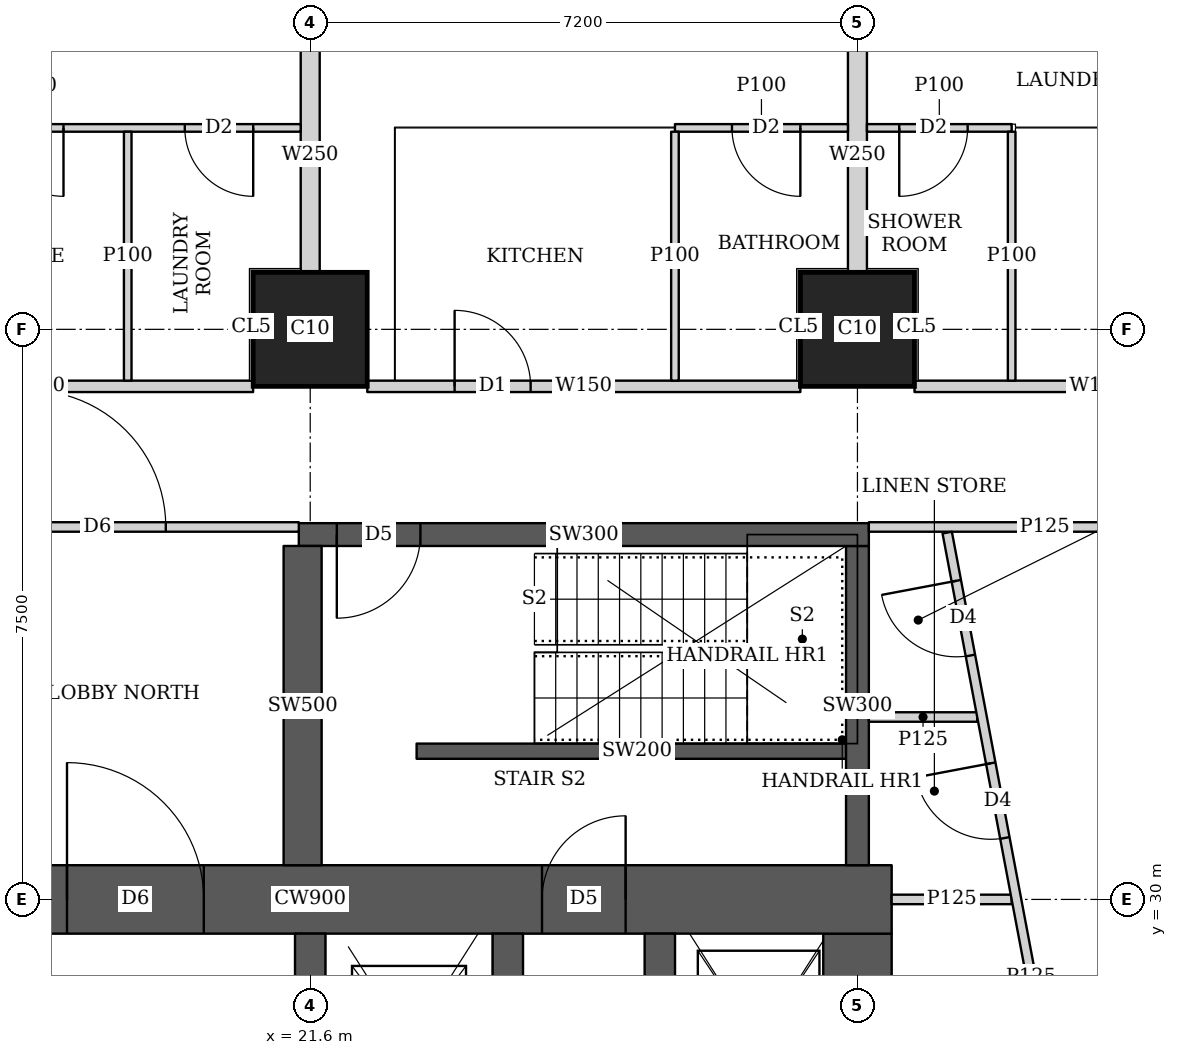
"""IFC4 building model, lengths in metres.
Left out: names, types, materials, properties, quantities, classifications, styles, units other than length and angle.
Written with IfcOpenShell. Run it as: python <this file> out.ifc"""

import sys

from ifc_helpers import new_model, si_unit, direction, frame, frame_2d, origin, origin_2d, place, context, subcontext, project, spatial, rectangle, extrude, element, fill, save


model = new_model("IFC4")
c1 = context("Model", 3, precision=1e-05, world=origin(), true_north=direction((0.0, 1.0)))
c2 = subcontext(c1, "Body", "Model", "MODEL_VIEW")
j1 = project(units=[si_unit("LENGTHUNIT", "METRE"), si_unit("PLANEANGLEUNIT", "RADIAN")], contexts=[c1])
p1 = place(None, origin())
s1 = spatial("IfcSite", under=j1, at=p1, CompositionType="ELEMENT")
p2 = place(p1, origin())
s2 = spatial("IfcBuilding", under=s1, at=p2, CompositionType="ELEMENT")
p3 = place(p2, frame((0.0, 0.0, 169.55)))
s3 = spatial("IfcBuildingStorey", under=s2, at=p3, CompositionType="ELEMENT", Elevation=169.55)
for number, where, z_axis, x_axis in (
    (1, (21.6, 37.5, 0.0), (0.0, 0.0, 1.0), (1.0, 0.0, 0.0)),
    (2, (28.8, 37.5, 0.0), (0.0, 0.0, 1.0), (1.0, 0.0, 0.0)),
):
    element("IfcColumn", number, at=place(p3, frame(where, z_axis=z_axis, x_axis=x_axis)), inside=s3, PredefinedType="COLUMN", context=c2, shape_type="SweptSolid", body=[
        extrude(rectangle(XDim=1.5, YDim=1.5, at=origin_2d()), origin(), (0.0, 0.0, 1.0), 3.75),
    ])
p4 = place(p3, frame((13.95, 30.0, 0.0), z_axis=(0.0, 0.0, 1.0), x_axis=(1.0, 0.0, 0.0)))
e3 = element("IfcWall", 3, at=p4, inside=s3, PredefinedType="SHEAR", context=c2, shape_type="SweptSolid", body=[
    extrude(rectangle(XDim=15.3, YDim=0.9, at=frame_2d((7.65, 0.0))), origin(), (0.0, 0.0, 1.0), 3.75),
])
p5 = place(p4, frame((4.45, 0.0, 0.0)))
e4 = element("IfcOpeningElement", 4, at=p5, cuts=e3, PredefinedType="OPENING", context=c2, shape_type="SweptSolid", body=[
    extrude(rectangle(XDim=1.8, YDim=2.1, at=frame_2d((0.9, 1.05))), frame((0.0, 0.46, 0.0), z_axis=(0.0, -1.0, 0.0), x_axis=(1.0, 0.0, 0.0)), (0.0, 0.0, 1.0), 0.92),
])
p6 = place(p4, frame((10.7, 0.0, 0.0)))
e5 = element("IfcOpeningElement", 5, at=p6, cuts=e3, PredefinedType="OPENING", context=c2, shape_type="SweptSolid", body=[
    extrude(rectangle(XDim=1.1, YDim=2.1, at=frame_2d((0.55, 1.05))), frame((0.0, 0.46, 0.0), z_axis=(0.0, -1.0, 0.0), x_axis=(1.0, 0.0, 0.0)), (0.0, 0.0, 1.0), 0.92),
])
p7 = place(p3, frame((28.8, 15.45, 0.0), z_axis=(0.0, 0.0, 1.0), x_axis=(0.0, 1.0, 0.0)))
e6 = element("IfcWall", 6, at=p7, inside=s3, PredefinedType="SHEAR", context=c2, shape_type="SweptSolid", body=[
    extrude(rectangle(XDim=14.1, YDim=0.9, at=frame_2d((7.05, 0.0))), origin(), (0.0, 0.0, 1.0), 3.75),
])
p8 = place(p3, frame((21.6, 15.45, 0.0), z_axis=(0.0, 0.0, 1.0), x_axis=(0.0, 1.0, 0.0)))
e7 = element("IfcWall", 7, at=p8, inside=s3, PredefinedType="SHEAR", context=c2, shape_type="SweptSolid", body=[
    extrude(rectangle(XDim=14.1, YDim=0.4, at=frame_2d((7.05, 0.0))), origin(), (0.0, 0.0, 1.0), 3.75),
])
p9 = place(p8, frame((0.875, 0.0, 0.0)))
e8 = element("IfcOpeningElement", 8, at=p9, cuts=e7, PredefinedType="OPENING", context=c2, shape_type="SweptSolid", body=[
    extrude(rectangle(XDim=1.1, YDim=2.1, at=frame_2d((0.55, 1.05))), frame((0.0, 0.21, 0.0), z_axis=(0.0, -1.0, 0.0), x_axis=(1.0, 0.0, 0.0)), (0.0, 0.0, 1.0), 0.42),
])
p10 = place(p8, frame((4.625, 0.0, 0.0)))
e9 = element("IfcOpeningElement", 9, at=p10, cuts=e7, PredefinedType="OPENING", context=c2, shape_type="SweptSolid", body=[
    extrude(rectangle(XDim=1.1, YDim=2.1, at=frame_2d((0.55, 1.05))), frame((0.0, 0.21, 0.0), z_axis=(0.0, -1.0, 0.0), x_axis=(1.0, 0.0, 0.0)), (0.0, 0.0, 1.0), 0.42),
])
p11 = place(p8, frame((8.375, 0.0, 0.0)))
e10 = element("IfcOpeningElement", 10, at=p11, cuts=e7, PredefinedType="OPENING", context=c2, shape_type="SweptSolid", body=[
    extrude(rectangle(XDim=1.1, YDim=2.1, at=frame_2d((0.55, 1.05))), frame((0.0, 0.21, 0.0), z_axis=(0.0, -1.0, 0.0), x_axis=(1.0, 0.0, 0.0)), (0.0, 0.0, 1.0), 0.42),
])
p12 = place(p8, frame((12.125, 0.0, 0.0)))
e11 = element("IfcOpeningElement", 11, at=p12, cuts=e7, PredefinedType="OPENING", context=c2, shape_type="SweptSolid", body=[
    extrude(rectangle(XDim=1.1, YDim=2.1, at=frame_2d((0.55, 1.05))), frame((0.0, 0.21, 0.0), z_axis=(0.0, -1.0, 0.0), x_axis=(1.0, 0.0, 0.0)), (0.0, 0.0, 1.0), 0.42),
])
p13 = place(p3, frame((24.2, 15.45, 0.0), z_axis=(0.0, 0.0, 1.0), x_axis=(0.0, 1.0, 0.0)))
e12 = element("IfcWall", 12, at=p13, inside=s3, PredefinedType="SHEAR", context=c2, shape_type="SweptSolid", body=[
    extrude(rectangle(XDim=14.1, YDim=0.4, at=frame_2d((7.05, 0.0))), origin(), (0.0, 0.0, 1.0), 3.75),
])
p14 = place(p3, frame((26.2, 26.45, 0.0), z_axis=(0.0, 0.0, 1.0), x_axis=(0.0, 1.0, 0.0)))
e13 = element("IfcWall", 13, at=p14, inside=s3, PredefinedType="SHEAR", context=c2, shape_type="SweptSolid", body=[
    extrude(rectangle(XDim=3.1, YDim=0.4, at=frame_2d((1.55, 0.0))), origin(), (0.0, 0.0, 1.0), 3.75),
])
p15 = place(p14, frame((1.075, 0.0, 0.0)))
e14 = element("IfcOpeningElement", 14, at=p15, cuts=e13, PredefinedType="OPENING", context=c2, shape_type="SweptSolid", body=[
    extrude(rectangle(XDim=1.2, YDim=2.1, at=frame_2d((0.6, 1.05))), frame((0.0, 0.21, 0.0), z_axis=(0.0, -1.0, 0.0), x_axis=(1.0, 0.0, 0.0)), (0.0, 0.0, 1.0), 0.42),
])
p16 = place(p3, frame((21.45, 34.8, 0.0), z_axis=(0.0, 0.0, 1.0), x_axis=(1.0, 0.0, 0.0)))
e15 = element("IfcWall", 15, at=p16, inside=s3, PredefinedType="SHEAR", context=c2, shape_type="SweptSolid", body=[
    extrude(rectangle(XDim=7.5, YDim=0.3, at=frame_2d((3.75, 0.0))), origin(), (0.0, 0.0, 1.0), 3.75),
])
p17 = place(p16, frame((0.5, 0.0, 0.0)))
e16 = element("IfcOpeningElement", 16, at=p17, cuts=e15, PredefinedType="OPENING", context=c2, shape_type="SweptSolid", body=[
    extrude(rectangle(XDim=1.1, YDim=2.1, at=frame_2d((0.55, 1.05))), frame((0.0, 0.16, 0.0), z_axis=(0.0, -1.0, 0.0), x_axis=(1.0, 0.0, 0.0)), (0.0, 0.0, 1.0), 0.32),
])
p18 = place(p3, frame((21.5, 30.45, 0.0), z_axis=(0.0, 0.0, 1.0), x_axis=(0.0, 1.0, 0.0)))
e17 = element("IfcWall", 17, at=p18, inside=s3, PredefinedType="SHEAR", context=c2, shape_type="SweptSolid", body=[
    extrude(rectangle(XDim=4.2, YDim=0.5, at=frame_2d((2.1, 0.0))), origin(), (0.0, 0.0, 1.0), 3.75),
])
p19 = place(p3, frame((28.8, 30.45, 0.0), z_axis=(0.0, 0.0, 1.0), x_axis=(0.0, 1.0, 0.0)))
e18 = element("IfcWall", 18, at=p19, inside=s3, PredefinedType="SHEAR", context=c2, shape_type="SweptSolid", body=[
    extrude(rectangle(XDim=4.2, YDim=0.3, at=frame_2d((2.1, 0.0))), origin(), (0.0, 0.0, 1.0), 3.75),
])
p20 = place(p3, frame((15.151, 36.75, 0.0), z_axis=(0.0, 0.0, 1.0), x_axis=(1.0, 0.0, 0.0)))
e19 = element("IfcWall", 19, at=p20, inside=s3, PredefinedType="SOLIDWALL", context=c2, shape_type="SweptSolid", body=[
    extrude(rectangle(XDim=5.698, YDim=0.15, at=frame_2d((2.849, 0.0))), origin(), (0.0, 0.0, 1.0), 3.5),
])
p21 = place(p3, frame((22.351, 36.75, 0.0), z_axis=(0.0, 0.0, 1.0), x_axis=(1.0, 0.0, 0.0)))
e20 = element("IfcWall", 20, at=p21, inside=s3, PredefinedType="SOLIDWALL", context=c2, shape_type="SweptSolid", body=[
    extrude(rectangle(XDim=5.698, YDim=0.15, at=frame_2d((2.849, 0.0))), origin(), (0.0, 0.0, 1.0), 3.5),
])
p22 = place(p21, frame((1.149, 0.0, 0.0)))
e21 = element("IfcOpeningElement", 21, at=p22, cuts=e20, PredefinedType="OPENING", context=c2, shape_type="SweptSolid", body=[
    extrude(rectangle(XDim=1.0, YDim=2.1, at=frame_2d((0.5, 1.05))), frame((0.0, 0.085, 0.0), z_axis=(0.0, -1.0, 0.0), x_axis=(1.0, 0.0, 0.0)), (0.0, 0.0, 1.0), 0.17),
])
p23 = place(p3, frame((29.551, 36.75, 0.0), z_axis=(0.0, 0.0, 1.0), x_axis=(1.0, 0.0, 0.0)))
e22 = element("IfcWall", 22, at=p23, inside=s3, PredefinedType="SOLIDWALL", context=c2, shape_type="SweptSolid", body=[
    extrude(rectangle(XDim=5.422, YDim=0.15, at=frame_2d((2.711, 0.0))), origin(), (0.0, 0.0, 1.0), 3.5),
])
p24 = place(p23, frame((2.895, 0.0, 0.0)))
e23 = element("IfcOpeningElement", 23, at=p24, cuts=e22, PredefinedType="OPENING", context=c2, shape_type="SweptSolid", body=[
    extrude(rectangle(XDim=1.0, YDim=2.1, at=frame_2d((0.5, 1.05))), frame((0.0, 0.085, 0.0), z_axis=(0.0, -1.0, 0.0), x_axis=(1.0, 0.0, 0.0)), (0.0, 0.0, 1.0), 0.17),
])
p25 = place(p3, frame((14.4, 40.15, 0.0), z_axis=(0.0, 0.0, 1.0), x_axis=(1.0, 0.0, 0.0)))
e24 = element("IfcWall", 24, at=p25, inside=s3, PredefinedType="PARTITIONING", context=c2, shape_type="SweptSolid", body=[
    extrude(rectangle(XDim=7.075, YDim=0.1, at=frame_2d((3.538, 0.0))), origin(), (0.0, 0.0, 1.0), 3.5),
])
p26 = place(p25, frame((0.655, 0.0, 0.0)))
e25 = element("IfcOpeningElement", 25, at=p26, cuts=e24, PredefinedType="OPENING", context=c2, shape_type="SweptSolid", body=[
    extrude(rectangle(XDim=0.9, YDim=2.1, at=frame_2d((0.45, 1.05))), frame((0.0, 0.06, 0.0), z_axis=(0.0, -1.0, 0.0), x_axis=(1.0, 0.0, 0.0)), (0.0, 0.0, 1.0), 0.12),
])
p27 = place(p25, frame((5.55, 0.0, 0.0)))
e26 = element("IfcOpeningElement", 26, at=p27, cuts=e24, PredefinedType="OPENING", context=c2, shape_type="SweptSolid", body=[
    extrude(rectangle(XDim=0.9, YDim=2.1, at=frame_2d((0.45, 1.05))), frame((0.0, 0.06, 0.0), z_axis=(0.0, -1.0, 0.0), x_axis=(1.0, 0.0, 0.0)), (0.0, 0.0, 1.0), 0.12),
])
p28 = place(p25, frame((3.054, 0.0, 0.0)))
e27 = element("IfcOpeningElement", 27, at=p28, cuts=e24, PredefinedType="OPENING", context=c2, shape_type="SweptSolid", body=[
    extrude(rectangle(XDim=0.9, YDim=2.1, at=frame_2d((0.45, 1.05))), frame((0.0, 0.06, 0.0), z_axis=(0.0, -1.0, 0.0), x_axis=(1.0, 0.0, 0.0)), (0.0, 0.0, 1.0), 0.12),
])
p29 = place(p3, frame((19.199, 36.825, 0.0), z_axis=(0.0, 0.0, 1.0), x_axis=(0.0, 1.0, 0.0)))
e28 = element("IfcWall", 28, at=p29, inside=s3, PredefinedType="PARTITIONING", context=c2, shape_type="SweptSolid", body=[
    extrude(rectangle(XDim=3.275, YDim=0.1, at=frame_2d((1.638, 0.0))), origin(), (0.0, 0.0, 1.0), 3.5),
])
p30 = place(p3, frame((26.399, 40.15, 0.0), z_axis=(0.0, 0.0, 1.0), x_axis=(1.0, 0.0, 0.0)))
e29 = element("IfcWall", 29, at=p30, inside=s3, PredefinedType="PARTITIONING", context=c2, shape_type="SweptSolid", body=[
    extrude(rectangle(XDim=2.276, YDim=0.1, at=frame_2d((1.138, 0.0))), origin(), (0.0, 0.0, 1.0), 3.5),
])
p31 = place(p30, frame((0.75, 0.0, 0.0)))
e30 = element("IfcOpeningElement", 30, at=p31, cuts=e29, PredefinedType="OPENING", context=c2, shape_type="SweptSolid", body=[
    extrude(rectangle(XDim=0.9, YDim=2.1, at=frame_2d((0.45, 1.05))), frame((0.0, 0.06, 0.0), z_axis=(0.0, -1.0, 0.0), x_axis=(1.0, 0.0, 0.0)), (0.0, 0.0, 1.0), 0.12),
])
p32 = place(p3, frame((26.399, 36.825, 0.0), z_axis=(0.0, 0.0, 1.0), x_axis=(0.0, 1.0, 0.0)))
e31 = element("IfcWall", 31, at=p32, inside=s3, PredefinedType="PARTITIONING", context=c2, shape_type="SweptSolid", body=[
    extrude(rectangle(XDim=3.275, YDim=0.1, at=frame_2d((1.638, 0.0))), origin(), (0.0, 0.0, 1.0), 3.5),
])
p33 = place(p3, frame((21.6, 38.251, 0.0), z_axis=(0.0, 0.0, 1.0), x_axis=(0.0, 1.0, 0.0)))
e32 = element("IfcWall", 32, at=p33, inside=s3, PredefinedType="SOLIDWALL", context=c2, shape_type="SweptSolid", body=[
    extrude(rectangle(XDim=3.099, YDim=0.25, at=frame_2d((1.55, 0.0))), origin(), (0.0, 0.0, 1.0), 3.5),
])
p34 = place(p3, frame((28.925, 40.15, 0.0), z_axis=(0.0, 0.0, 1.0), x_axis=(1.0, 0.0, 0.0)))
e33 = element("IfcWall", 33, at=p34, inside=s3, PredefinedType="PARTITIONING", context=c2, shape_type="SweptSolid", body=[
    extrude(rectangle(XDim=1.904, YDim=0.1, at=frame_2d((0.952, 0.0))), origin(), (0.0, 0.0, 1.0), 3.5),
])
p35 = place(p34, frame((0.425, 0.0, 0.0)))
e34 = element("IfcOpeningElement", 34, at=p35, cuts=e33, PredefinedType="OPENING", context=c2, shape_type="SweptSolid", body=[
    extrude(rectangle(XDim=0.9, YDim=2.1, at=frame_2d((0.45, 1.05))), frame((0.0, 0.06, 0.0), z_axis=(0.0, -1.0, 0.0), x_axis=(1.0, 0.0, 0.0)), (0.0, 0.0, 1.0), 0.12),
])
p36 = place(p3, frame((30.829, 36.825, 0.0), z_axis=(0.0, 0.0, 1.0), x_axis=(0.0, 1.0, 0.0)))
e35 = element("IfcWall", 35, at=p36, inside=s3, PredefinedType="PARTITIONING", context=c2, shape_type="SweptSolid", body=[
    extrude(rectangle(XDim=3.275, YDim=0.1, at=frame_2d((1.638, 0.0))), origin(), (0.0, 0.0, 1.0), 3.5),
])
p37 = place(p3, frame((28.8, 38.251, 0.0), z_axis=(0.0, 0.0, 1.0), x_axis=(0.0, 1.0, 0.0)))
e36 = element("IfcWall", 36, at=p37, inside=s3, PredefinedType="SOLIDWALL", context=c2, shape_type="SweptSolid", body=[
    extrude(rectangle(XDim=3.099, YDim=0.25, at=frame_2d((1.55, 0.0))), origin(), (0.0, 0.0, 1.0), 3.5),
])
p38 = place(p3, frame((13.95, 34.9, 0.0), z_axis=(0.0, 0.0, 1.0), x_axis=(1.0, 0.0, 0.0)))
e37 = element("IfcWall", 37, at=p38, inside=s3, PredefinedType="PARTITIONING", context=c2, shape_type="SweptSolid", body=[
    extrude(rectangle(XDim=7.5, YDim=0.125, at=frame_2d((3.75, 0.0))), origin(), (0.0, 0.0, 1.0), 3.5),
])
p39 = place(p38, frame((3.95, 0.0, 0.0)))
e38 = element("IfcOpeningElement", 38, at=p39, cuts=e37, PredefinedType="OPENING", context=c2, shape_type="SweptSolid", body=[
    extrude(rectangle(XDim=1.8, YDim=2.1, at=frame_2d((0.9, 1.05))), frame((0.0, 0.073, 0.0), z_axis=(0.0, -1.0, 0.0), x_axis=(1.0, 0.0, 0.0)), (0.0, 0.0, 1.0), 0.145),
])
p40 = place(p3, frame((28.95, 34.9, 0.0), z_axis=(0.0, 0.0, 1.0), x_axis=(1.0, 0.0, 0.0)))
e39 = element("IfcWall", 39, at=p40, inside=s3, PredefinedType="PARTITIONING", context=c2, shape_type="SweptSolid", body=[
    extrude(rectangle(XDim=4.63, YDim=0.125, at=frame_2d((2.315, 0.0))), origin(), (0.0, 0.0, 1.0), 3.5),
])
p41 = place(p3, frame((32.188, 23.141, 0.0), z_axis=(0.0, 0.0, 1.0), x_axis=(-0.185598625075, 0.98262564101, 0.0)))
e40 = element("IfcWall", 40, at=p41, inside=s3, PredefinedType="PARTITIONING", context=c2, shape_type="SweptSolid", body=[
    extrude(rectangle(XDim=11.891, YDim=0.125, at=frame_2d((5.946, 0.0))), origin(), (0.0, 0.0, 1.0), 3.5),
])
p42 = place(p41, frame((7.803, 0.0, 0.0)))
e41 = element("IfcOpeningElement", 41, at=p42, cuts=e40, PredefinedType="OPENING", context=c2, shape_type="SweptSolid", body=[
    extrude(rectangle(XDim=1.0, YDim=2.1, at=frame_2d((0.5, 1.05))), frame((0.0, 0.073, 0.0), z_axis=(0.0, -1.0, 0.0), x_axis=(1.0, 0.0, 0.0)), (0.0, 0.0, 1.0), 0.145),
])
p43 = place(p41, frame((10.246, 0.0, 0.0)))
e42 = element("IfcOpeningElement", 42, at=p43, cuts=e40, PredefinedType="OPENING", context=c2, shape_type="SweptSolid", body=[
    extrude(rectangle(XDim=1.0, YDim=2.1, at=frame_2d((0.5, 1.05))), frame((0.0, 0.073, 0.0), z_axis=(0.0, -1.0, 0.0), x_axis=(1.0, 0.0, 0.0)), (0.0, 0.0, 1.0), 0.145),
])
p44 = place(p3, frame((29.25, 30.0, 0.0), z_axis=(0.0, 0.0, 1.0), x_axis=(1.0, 0.0, 0.0)))
e43 = element("IfcWall", 43, at=p44, inside=s3, PredefinedType="PARTITIONING", context=c2, shape_type="SweptSolid", body=[
    extrude(rectangle(XDim=1.579, YDim=0.125, at=frame_2d((0.79, 0.0))), origin(), (0.0, 0.0, 1.0), 3.5),
])
p45 = place(p3, frame((28.95, 32.4, 0.0), z_axis=(0.0, 0.0, 1.0), x_axis=(1.0, 0.0, 0.0)))
e44 = element("IfcWall", 44, at=p45, inside=s3, PredefinedType="PARTITIONING", context=c2, shape_type="SweptSolid", body=[
    extrude(rectangle(XDim=1.426, YDim=0.125, at=frame_2d((0.713, 0.0))), origin(), (0.0, 0.0, 1.0), 3.5),
])
p46 = place(p3, frame((23.0, 31.95, 0.0), z_axis=(0.0, 0.0, 1.0), x_axis=(1.0, 0.0, 0.0)))
e45 = element("IfcWall", 45, at=p46, inside=s3, PredefinedType="SHEAR", context=c2, shape_type="SweptSolid", body=[
    extrude(rectangle(XDim=5.8, YDim=0.2, at=frame_2d((2.9, 0.0))), origin(), (0.0, 0.0, 1.0), 3.75),
])
p47 = place(p27, origin())
e46 = element("IfcDoor", 46, at=p47, inside=s3, OperationType="SINGLE_SWING_LEFT", PredefinedType="DOOR", context=c2, shape_type="SweptSolid", body=[
    extrude(rectangle(XDim=0.9, YDim=2.1, at=frame_2d((0.45, 1.05))), frame((0.0, 0.025, 0.0), z_axis=(0.0, -1.0, 0.0), x_axis=(1.0, 0.0, 0.0)), (0.0, 0.0, 1.0), 0.05),
])
fill(e26, e46)
p48 = place(p28, origin())
e47 = element("IfcDoor", 47, at=p48, inside=s3, OperationType="SINGLE_SWING_LEFT", PredefinedType="DOOR", context=c2, shape_type="SweptSolid", body=[
    extrude(rectangle(XDim=0.9, YDim=2.1, at=frame_2d((0.45, 1.05))), frame((0.0, 0.025, 0.0), z_axis=(0.0, -1.0, 0.0), x_axis=(1.0, 0.0, 0.0)), (0.0, 0.0, 1.0), 0.05),
])
fill(e27, e47)
p49 = place(p31, origin())
e48 = element("IfcDoor", 48, at=p49, inside=s3, OperationType="SINGLE_SWING_LEFT", PredefinedType="DOOR", context=c2, shape_type="SweptSolid", body=[
    extrude(rectangle(XDim=0.9, YDim=2.1, at=frame_2d((0.45, 1.05))), frame((0.0, 0.025, 0.0), z_axis=(0.0, -1.0, 0.0), x_axis=(1.0, 0.0, 0.0)), (0.0, 0.0, 1.0), 0.05),
])
fill(e30, e48)
p50 = place(p22, origin())
e49 = element("IfcDoor", 49, at=p50, inside=s3, OperationType="SINGLE_SWING_LEFT", PredefinedType="DOOR", context=c2, shape_type="SweptSolid", body=[
    extrude(rectangle(XDim=1.0, YDim=2.1, at=frame_2d((0.5, 1.05))), frame((0.0, 0.025, 0.0), z_axis=(0.0, -1.0, 0.0), x_axis=(1.0, 0.0, 0.0)), (0.0, 0.0, 1.0), 0.05),
])
fill(e21, e49)
p51 = place(p35, origin())
e50 = element("IfcDoor", 50, at=p51, inside=s3, OperationType="SINGLE_SWING_RIGHT", PredefinedType="DOOR", context=c2, shape_type="SweptSolid", body=[
    extrude(rectangle(XDim=0.9, YDim=2.1, at=frame_2d((0.45, 1.05))), frame((0.0, 0.025, 0.0), z_axis=(0.0, -1.0, 0.0), x_axis=(1.0, 0.0, 0.0)), (0.0, 0.0, 1.0), 0.05),
])
fill(e34, e50)
p52 = place(p39, origin())
e51 = element("IfcDoor", 51, at=p52, inside=s3, OperationType="DOUBLE_DOOR_SINGLE_SWING", PredefinedType="DOOR", context=c2, shape_type="SweptSolid", body=[
    extrude(rectangle(XDim=1.8, YDim=2.1, at=frame_2d((0.9, 1.05))), frame((0.0, 0.025, 0.0), z_axis=(0.0, -1.0, 0.0), x_axis=(1.0, 0.0, 0.0)), (0.0, 0.0, 1.0), 0.05),
])
fill(e38, e51)
p53 = place(p42, origin())
e52 = element("IfcDoor", 52, at=p53, inside=s3, OperationType="SINGLE_SWING_RIGHT", PredefinedType="DOOR", context=c2, shape_type="SweptSolid", body=[
    extrude(rectangle(XDim=1.0, YDim=2.1, at=frame_2d((0.5, 1.05))), frame((0.0, 0.025, 0.0), z_axis=(0.0, -1.0, 0.0), x_axis=(1.0, 0.0, 0.0)), (0.0, 0.0, 1.0), 0.05),
])
fill(e41, e52)
p54 = place(p43, origin())
e53 = element("IfcDoor", 53, at=p54, inside=s3, OperationType="SINGLE_SWING_RIGHT", PredefinedType="DOOR", context=c2, shape_type="SweptSolid", body=[
    extrude(rectangle(XDim=1.0, YDim=2.1, at=frame_2d((0.5, 1.05))), frame((0.0, 0.025, 0.0), z_axis=(0.0, -1.0, 0.0), x_axis=(1.0, 0.0, 0.0)), (0.0, 0.0, 1.0), 0.05),
])
fill(e42, e53)
p55 = place(p5, origin())
e54 = element("IfcDoor", 54, at=p55, inside=s3, OperationType="DOUBLE_DOOR_SINGLE_SWING", PredefinedType="DOOR", context=c2, shape_type="SweptSolid", body=[
    extrude(rectangle(XDim=1.8, YDim=2.1, at=frame_2d((0.9, 1.05))), frame((0.0, 0.025, 0.0), z_axis=(0.0, -1.0, 0.0), x_axis=(1.0, 0.0, 0.0)), (0.0, 0.0, 1.0), 0.05),
])
fill(e4, e54)
p56 = place(p6, origin())
e55 = element("IfcDoor", 55, at=p56, inside=s3, OperationType="SINGLE_SWING_RIGHT", PredefinedType="DOOR", context=c2, shape_type="SweptSolid", body=[
    extrude(rectangle(XDim=1.1, YDim=2.1, at=frame_2d((0.55, 1.05))), frame((0.0, 0.025, 0.0), z_axis=(0.0, -1.0, 0.0), x_axis=(1.0, 0.0, 0.0)), (0.0, 0.0, 1.0), 0.05),
])
fill(e5, e55)
p57 = place(p17, origin())
e56 = element("IfcDoor", 56, at=p57, inside=s3, OperationType="SINGLE_SWING_RIGHT", PredefinedType="DOOR", context=c2, shape_type="SweptSolid", body=[
    extrude(rectangle(XDim=1.1, YDim=2.1, at=frame_2d((0.55, 1.05))), frame((0.0, 0.025, 0.0), z_axis=(0.0, -1.0, 0.0), x_axis=(1.0, 0.0, 0.0)), (0.0, 0.0, 1.0), 0.05),
])
fill(e16, e56)
save(model, sys.argv[1])
